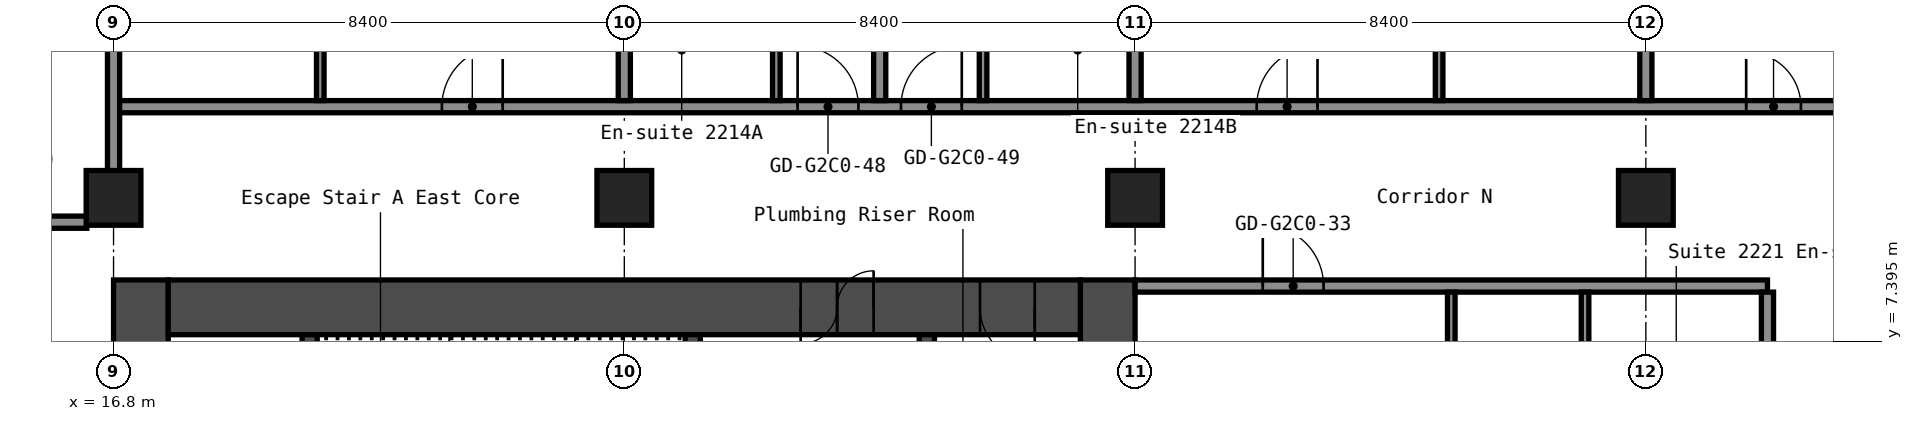
"""IFC4 building model, lengths in metres.
Left out: names, types, materials, properties, quantities, classifications, styles, units other than length and angle.
Written with IfcOpenShell. Run it as: python <this file> out.ifc"""

import sys

from ifc_helpers import new_model, si_unit, direction, frame, frame_2d, origin, origin_2d, place, context, subcontext, project, spatial, rectangle, hollow_rectangle, extrude, element, fill, save


model = new_model("IFC4")
c1 = context("Model", 3, precision=1e-05, world=origin(), true_north=direction((0.0, 1.0)))
c2 = subcontext(c1, "Body", "Model", "MODEL_VIEW")
j1 = project(units=[si_unit("LENGTHUNIT", "METRE"), si_unit("PLANEANGLEUNIT", "RADIAN")], contexts=[c1])
p1 = place(None, origin())
s1 = spatial("IfcSite", under=j1, at=p1, CompositionType="ELEMENT")
p2 = place(p1, origin())
s2 = spatial("IfcBuilding", under=s1, at=p2, CompositionType="ELEMENT")
p3 = place(p2, frame((0.0, 0.0, 81.8)))
s3 = spatial("IfcBuildingStorey", under=s2, at=p3, CompositionType="ELEMENT", Elevation=81.8)
for number, where, z_axis, x_axis in (
    (1, (16.8, 9.75, 0.0), (0.0, 0.0, 1.0), (1.0, 0.0, 0.0)),
    (2, (25.2, 9.75, 0.0), (0.0, 0.0, 1.0), (1.0, 0.0, 0.0)),
    (3, (33.6, 9.75, 0.0), (0.0, 0.0, 1.0), (1.0, 0.0, 0.0)),
    (4, (42.0, 9.75, 0.0), (0.0, 0.0, 1.0), (1.0, 0.0, 0.0)),
):
    element("IfcColumn", number, at=place(p3, frame(where, z_axis=z_axis, x_axis=x_axis)), inside=s3, PredefinedType="COLUMN", context=c2, shape_type="SweptSolid", body=[
        extrude(hollow_rectangle(XDim=0.9, YDim=0.9, WallThickness=0.036, at=origin_2d()), origin(), (0.0, 0.0, 1.0), 2.8),
    ])
p4 = place(p3, frame((17.25, -8.4, 0.0), z_axis=(0.0, 0.0, 1.0), x_axis=(0.0, 1.0, 0.0)))
e5 = element("IfcWall", 5, at=p4, inside=s3, PredefinedType="SHEAR", context=c2, shape_type="SweptSolid", body=[
    extrude(rectangle(XDim=16.8, YDim=0.9, at=frame_2d((8.4, 0.0))), origin(), (0.0, 0.0, 1.0), 2.8),
])
p5 = place(p4, frame((7.6, 0.0, 0.0)))
e6 = element("IfcOpeningElement", 6, at=p5, cuts=e5, PredefinedType="OPENING", context=c2, shape_type="SweptSolid", body=[
    extrude(rectangle(XDim=1.2, YDim=2.1, at=frame_2d((0.6, 1.05))), frame((0.0, 0.46, 0.0), z_axis=(0.0, -1.0, 0.0), x_axis=(1.0, 0.0, 0.0)), (0.0, 0.0, 1.0), 0.92),
])
p6 = place(p3, frame((33.15, -8.4, 0.0), z_axis=(0.0, 0.0, 1.0), x_axis=(0.0, 1.0, 0.0)))
e7 = element("IfcWall", 7, at=p6, inside=s3, PredefinedType="SHEAR", context=c2, shape_type="SweptSolid", body=[
    extrude(rectangle(XDim=16.8, YDim=0.9, at=frame_2d((8.4, 0.0))), origin(), (0.0, 0.0, 1.0), 2.8),
])
p7 = place(p3, frame((17.7, 7.95, 0.0), z_axis=(0.0, 0.0, 1.0), x_axis=(1.0, 0.0, 0.0)))
e8 = element("IfcWall", 8, at=p7, inside=s3, PredefinedType="SHEAR", context=c2, shape_type="SweptSolid", body=[
    extrude(rectangle(XDim=15.0, YDim=0.9, at=frame_2d((7.5, 0.0))), origin(), (0.0, 0.0, 1.0), 2.8),
])
p8 = place(p7, frame((10.4, 0.0, 0.0)))
e9 = element("IfcOpeningElement", 9, at=p8, cuts=e8, PredefinedType="OPENING", context=c2, shape_type="SweptSolid", body=[
    extrude(rectangle(XDim=1.2, YDim=2.1, at=frame_2d((0.6, 1.05))), frame((0.0, 0.46, 0.0), z_axis=(0.0, -1.0, 0.0), x_axis=(1.0, 0.0, 0.0)), (0.0, 0.0, 1.0), 0.92),
])
p9 = place(p7, frame((13.35, 0.0, 0.0)))
e10 = element("IfcOpeningElement", 10, at=p9, cuts=e8, PredefinedType="OPENING", context=c2, shape_type="SweptSolid", body=[
    extrude(rectangle(XDim=0.9, YDim=2.1, at=frame_2d((0.45, 1.05))), frame((0.0, 0.46, 0.0), z_axis=(0.0, -1.0, 0.0), x_axis=(1.0, 0.0, 0.0)), (0.0, 0.0, 1.0), 0.92),
])
p10 = place(p3, frame((20.025, 1.2, 0.0), z_axis=(0.0, 0.0, 1.0), x_axis=(0.0, 1.0, 0.0)))
e11 = element("IfcWall", 11, at=p10, inside=s3, PredefinedType="SHEAR", context=c2, shape_type="SweptSolid", body=[
    extrude(rectangle(XDim=6.3, YDim=0.25, at=frame_2d((3.15, 0.0))), origin(), (0.0, 0.0, 1.0), 2.8),
])
p11 = place(p3, frame((26.325, 3.75, 0.0), z_axis=(0.0, 0.0, 1.0), x_axis=(0.0, 1.0, 0.0)))
e12 = element("IfcWall", 12, at=p11, inside=s3, PredefinedType="SHEAR", context=c2, shape_type="SweptSolid", body=[
    extrude(rectangle(XDim=3.75, YDim=0.25, at=frame_2d((1.875, 0.0))), origin(), (0.0, 0.0, 1.0), 2.8),
])
p12 = place(p11, frame((1.25, 0.0, 0.0)))
e13 = element("IfcOpeningElement", 13, at=p12, cuts=e12, PredefinedType="OPENING", context=c2, shape_type="SweptSolid", body=[
    extrude(rectangle(XDim=1.2, YDim=2.1, at=frame_2d((0.6, 1.05))), frame((0.0, 0.135, 0.0), z_axis=(0.0, -1.0, 0.0), x_axis=(1.0, 0.0, 0.0)), (0.0, 0.0, 1.0), 0.27),
])
p13 = place(p3, frame((30.175, 1.45, 0.0), z_axis=(0.0, 0.0, 1.0), x_axis=(0.0, 1.0, 0.0)))
e14 = element("IfcWall", 14, at=p13, inside=s3, PredefinedType="SHEAR", context=c2, shape_type="SweptSolid", body=[
    extrude(rectangle(XDim=6.05, YDim=0.25, at=frame_2d((3.025, 0.0))), origin(), (0.0, 0.0, 1.0), 2.8),
])
p14 = place(p13, frame((2.625, 0.0, 0.0)))
e15 = element("IfcOpeningElement", 15, at=p14, cuts=e14, PredefinedType="OPENING", context=c2, shape_type="SweptSolid", body=[
    extrude(rectangle(XDim=1.1, YDim=2.1, at=frame_2d((0.55, 1.05))), frame((0.0, 0.135, 0.0), z_axis=(0.0, -1.0, 0.0), x_axis=(1.0, 0.0, 0.0)), (0.0, 0.0, 1.0), 0.27),
])
p15 = place(p3, frame((33.6, 8.3, 0.0), z_axis=(0.0, 0.0, 1.0), x_axis=(1.0, 0.0, 0.0)))
e16 = element("IfcWall", 16, at=p15, inside=s3, PredefinedType="PARTITIONING", context=c2, shape_type="SweptSolid", body=[
    extrude(rectangle(XDim=10.4, YDim=0.2, at=frame_2d((5.2, 0.0))), origin(), (0.0, 0.0, 1.0), 2.8),
])
p16 = place(p15, frame((2.1, 0.0, 0.0)))
e17 = element("IfcOpeningElement", 17, at=p16, cuts=e16, PredefinedType="OPENING", context=c2, shape_type="SweptSolid", body=[
    extrude(rectangle(XDim=1.0, YDim=2.1, at=frame_2d((0.5, 1.05))), frame((0.0, 0.11, 0.0), z_axis=(0.0, -1.0, 0.0), x_axis=(1.0, 0.0, 0.0)), (0.0, 0.0, 1.0), 0.22),
])
p17 = place(p3, frame((-16.36, 9.35, 0.0), z_axis=(0.0, 0.0, 1.0), x_axis=(1.0, 0.0, 0.0)))
e18 = element("IfcWall", 18, at=p17, inside=s3, PredefinedType="PARTITIONING", context=c2, shape_type="SweptSolid", body=[
    extrude(rectangle(XDim=32.72, YDim=0.2, at=frame_2d((16.36, 0.0))), origin(), (0.0, 0.0, 1.0), 2.8),
])
p18 = place(p17, frame((1.56, 0.0, 0.0)))
e19 = element("IfcOpeningElement", 19, at=p18, cuts=e18, PredefinedType="OPENING", context=c2, shape_type="SweptSolid", body=[
    extrude(rectangle(XDim=1.0, YDim=2.1, at=frame_2d((0.5, 1.05))), frame((0.0, 0.11, 0.0), z_axis=(0.0, -1.0, 0.0), x_axis=(1.0, 0.0, 0.0)), (0.0, 0.0, 1.0), 0.22),
])
p19 = place(p17, frame((10.81, 0.0, 0.0)))
e20 = element("IfcOpeningElement", 20, at=p19, cuts=e18, PredefinedType="OPENING", context=c2, shape_type="SweptSolid", body=[
    extrude(rectangle(XDim=1.0, YDim=2.1, at=frame_2d((0.5, 1.05))), frame((0.0, 0.11, 0.0), z_axis=(0.0, -1.0, 0.0), x_axis=(1.0, 0.0, 0.0)), (0.0, 0.0, 1.0), 0.22),
])
p20 = place(p17, frame((12.51, 0.0, 0.0)))
e21 = element("IfcOpeningElement", 21, at=p20, cuts=e18, PredefinedType="OPENING", context=c2, shape_type="SweptSolid", body=[
    extrude(rectangle(XDim=1.0, YDim=2.1, at=frame_2d((0.5, 1.05))), frame((0.0, 0.11, 0.0), z_axis=(0.0, -1.0, 0.0), x_axis=(1.0, 0.0, 0.0)), (0.0, 0.0, 1.0), 0.22),
])
p21 = place(p17, frame((18.26, 0.0, 0.0)))
e22 = element("IfcOpeningElement", 22, at=p21, cuts=e18, PredefinedType="OPENING", context=c2, shape_type="SweptSolid", body=[
    extrude(rectangle(XDim=0.9, YDim=2.1, at=frame_2d((0.45, 1.05))), frame((0.0, 0.11, 0.0), z_axis=(0.0, -1.0, 0.0), x_axis=(1.0, 0.0, 0.0)), (0.0, 0.0, 1.0), 0.22),
])
p22 = place(p17, frame((22.46, 0.0, 0.0)))
e23 = element("IfcOpeningElement", 23, at=p22, cuts=e18, PredefinedType="OPENING", context=c2, shape_type="SweptSolid", body=[
    extrude(rectangle(XDim=0.9, YDim=2.1, at=frame_2d((0.45, 1.05))), frame((0.0, 0.11, 0.0), z_axis=(0.0, -1.0, 0.0), x_axis=(1.0, 0.0, 0.0)), (0.0, 0.0, 1.0), 0.22),
])
p23 = place(p17, frame((26.58, 0.0, 0.0)))
e24 = element("IfcOpeningElement", 24, at=p23, cuts=e18, PredefinedType="OPENING", context=c2, shape_type="SweptSolid", body=[
    extrude(rectangle(XDim=0.9, YDim=2.1, at=frame_2d((0.45, 1.05))), frame((0.0, 0.11, 0.0), z_axis=(0.0, -1.0, 0.0), x_axis=(1.0, 0.0, 0.0)), (0.0, 0.0, 1.0), 0.22),
])
p24 = place(p17, frame((30.78, 0.0, 0.0)))
e25 = element("IfcOpeningElement", 25, at=p24, cuts=e18, PredefinedType="OPENING", context=c2, shape_type="SweptSolid", body=[
    extrude(rectangle(XDim=0.9, YDim=2.1, at=frame_2d((0.45, 1.05))), frame((0.0, 0.11, 0.0), z_axis=(0.0, -1.0, 0.0), x_axis=(1.0, 0.0, 0.0)), (0.0, 0.0, 1.0), 0.22),
])
p25 = place(p3, frame((16.8, 11.25, 0.0), z_axis=(0.0, 0.0, 1.0), x_axis=(1.0, 0.0, 0.0)))
e26 = element("IfcWall", 26, at=p25, inside=s3, PredefinedType="PARTITIONING", context=c2, shape_type="SweptSolid", body=[
    extrude(rectangle(XDim=29.7, YDim=0.2, at=frame_2d((14.85, 0.0))), origin(), (0.0, 0.0, 1.0), 2.8),
])
p26 = place(p25, frame((5.4, 0.0, 0.0)))
e27 = element("IfcOpeningElement", 27, at=p26, cuts=e26, PredefinedType="OPENING", context=c2, shape_type="SweptSolid", body=[
    extrude(rectangle(XDim=1.0, YDim=2.1, at=frame_2d((0.5, 1.05))), frame((0.0, 0.11, 0.0), z_axis=(0.0, -1.0, 0.0), x_axis=(1.0, 0.0, 0.0)), (0.0, 0.0, 1.0), 0.22),
])
p27 = place(p25, frame((11.25, 0.0, 0.0)))
e28 = element("IfcOpeningElement", 28, at=p27, cuts=e26, PredefinedType="OPENING", context=c2, shape_type="SweptSolid", body=[
    extrude(rectangle(XDim=1.0, YDim=2.1, at=frame_2d((0.5, 1.05))), frame((0.0, 0.11, 0.0), z_axis=(0.0, -1.0, 0.0), x_axis=(1.0, 0.0, 0.0)), (0.0, 0.0, 1.0), 0.22),
])
p28 = place(p25, frame((12.95, 0.0, 0.0)))
e29 = element("IfcOpeningElement", 29, at=p28, cuts=e26, PredefinedType="OPENING", context=c2, shape_type="SweptSolid", body=[
    extrude(rectangle(XDim=1.0, YDim=2.1, at=frame_2d((0.5, 1.05))), frame((0.0, 0.11, 0.0), z_axis=(0.0, -1.0, 0.0), x_axis=(1.0, 0.0, 0.0)), (0.0, 0.0, 1.0), 0.22),
])
p29 = place(p25, frame((18.8, 0.0, 0.0)))
e30 = element("IfcOpeningElement", 30, at=p29, cuts=e26, PredefinedType="OPENING", context=c2, shape_type="SweptSolid", body=[
    extrude(rectangle(XDim=1.0, YDim=2.1, at=frame_2d((0.5, 1.05))), frame((0.0, 0.11, 0.0), z_axis=(0.0, -1.0, 0.0), x_axis=(1.0, 0.0, 0.0)), (0.0, 0.0, 1.0), 0.22),
])
p30 = place(p25, frame((26.85, 0.0, 0.0)))
e31 = element("IfcOpeningElement", 31, at=p30, cuts=e26, PredefinedType="OPENING", context=c2, shape_type="SweptSolid", body=[
    extrude(rectangle(XDim=0.9, YDim=2.1, at=frame_2d((0.45, 1.05))), frame((0.0, 0.11, 0.0), z_axis=(0.0, -1.0, 0.0), x_axis=(1.0, 0.0, 0.0)), (0.0, 0.0, 1.0), 0.22),
])
p31 = place(p3, frame((16.8, 10.19, 0.0), z_axis=(0.0, 0.0, 1.0), x_axis=(0.0, 1.0, 0.0)))
e32 = element("IfcWall", 32, at=p31, inside=s3, PredefinedType="PARTITIONING", context=c2, shape_type="SweptSolid", body=[
    extrude(rectangle(XDim=13.36, YDim=0.2, at=frame_2d((6.68, 0.0))), origin(), (0.0, 0.0, 1.0), 2.8),
])
p32 = place(p3, frame((20.2, 11.35, 0.0), z_axis=(0.0, 0.0, 1.0), x_axis=(0.0, 1.0, 0.0)))
e33 = element("IfcWall", 33, at=p32, inside=s3, PredefinedType="PARTITIONING", context=c2, shape_type="SweptSolid", body=[
    extrude(rectangle(XDim=3.3, YDim=0.125, at=frame_2d((1.65, 0.0))), origin(), (0.0, 0.0, 1.0), 2.8),
])
p33 = place(p3, frame((25.2, 11.35, 0.0), z_axis=(0.0, 0.0, 1.0), x_axis=(0.0, 1.0, 0.0)))
e34 = element("IfcWall", 34, at=p33, inside=s3, PredefinedType="PARTITIONING", context=c2, shape_type="SweptSolid", body=[
    extrude(rectangle(XDim=12.2, YDim=0.2, at=frame_2d((6.1, 0.0))), origin(), (0.0, 0.0, 1.0), 2.8),
])
p34 = place(p3, frame((27.7, 11.35, 0.0), z_axis=(0.0, 0.0, 1.0), x_axis=(0.0, 1.0, 0.0)))
e35 = element("IfcWall", 35, at=p34, inside=s3, PredefinedType="PARTITIONING", context=c2, shape_type="SweptSolid", body=[
    extrude(rectangle(XDim=2.9, YDim=0.125, at=frame_2d((1.45, 0.0))), origin(), (0.0, 0.0, 1.0), 2.8),
])
p35 = place(p34, frame((1.5, 0.0, 0.0)))
e36 = element("IfcOpeningElement", 36, at=p35, cuts=e35, PredefinedType="OPENING", context=c2, shape_type="SweptSolid", body=[
    extrude(rectangle(XDim=0.8, YDim=2.1, at=frame_2d((0.4, 1.05))), frame((0.0, 0.073, 0.0), z_axis=(0.0, -1.0, 0.0), x_axis=(1.0, 0.0, 0.0)), (0.0, 0.0, 1.0), 0.145),
])
p36 = place(p3, frame((29.4, 11.35, 0.0), z_axis=(0.0, 0.0, 1.0), x_axis=(0.0, 1.0, 0.0)))
e37 = element("IfcWall", 37, at=p36, inside=s3, PredefinedType="PARTITIONING", context=c2, shape_type="SweptSolid", body=[
    extrude(rectangle(XDim=12.2, YDim=0.2, at=frame_2d((6.1, 0.0))), origin(), (0.0, 0.0, 1.0), 2.8),
])
p37 = place(p3, frame((31.1, 11.35, 0.0), z_axis=(0.0, 0.0, 1.0), x_axis=(0.0, 1.0, 0.0)))
e38 = element("IfcWall", 38, at=p37, inside=s3, PredefinedType="PARTITIONING", context=c2, shape_type="SweptSolid", body=[
    extrude(rectangle(XDim=2.9, YDim=0.125, at=frame_2d((1.45, 0.0))), origin(), (0.0, 0.0, 1.0), 2.8),
])
p38 = place(p37, frame((1.5, 0.0, 0.0)))
e39 = element("IfcOpeningElement", 39, at=p38, cuts=e38, PredefinedType="OPENING", context=c2, shape_type="SweptSolid", body=[
    extrude(rectangle(XDim=0.8, YDim=2.1, at=frame_2d((0.4, 1.05))), frame((0.0, 0.073, 0.0), z_axis=(0.0, -1.0, 0.0), x_axis=(1.0, 0.0, 0.0)), (0.0, 0.0, 1.0), 0.145),
])
p39 = place(p3, frame((33.6, 11.35, 0.0), z_axis=(0.0, 0.0, 1.0), x_axis=(0.0, 1.0, 0.0)))
e40 = element("IfcWall", 40, at=p39, inside=s3, PredefinedType="PARTITIONING", context=c2, shape_type="SweptSolid", body=[
    extrude(rectangle(XDim=12.2, YDim=0.2, at=frame_2d((6.1, 0.0))), origin(), (0.0, 0.0, 1.0), 2.8),
])
p40 = place(p3, frame((38.6, 11.35, 0.0), z_axis=(0.0, 0.0, 1.0), x_axis=(0.0, 1.0, 0.0)))
e41 = element("IfcWall", 41, at=p40, inside=s3, PredefinedType="PARTITIONING", context=c2, shape_type="SweptSolid", body=[
    extrude(rectangle(XDim=3.3, YDim=0.125, at=frame_2d((1.65, 0.0))), origin(), (0.0, 0.0, 1.0), 2.8),
])
p41 = place(p3, frame((38.8, 0.1, 0.0), z_axis=(0.0, 0.0, 1.0), x_axis=(0.0, 1.0, 0.0)))
e42 = element("IfcWall", 42, at=p41, inside=s3, PredefinedType="PARTITIONING", context=c2, shape_type="SweptSolid", body=[
    extrude(rectangle(XDim=8.1, YDim=0.125, at=frame_2d((4.05, 0.0))), origin(), (0.0, 0.0, 1.0), 2.8),
])
p42 = place(p41, frame((3.15, 0.0, 0.0)))
e43 = element("IfcOpeningElement", 43, at=p42, cuts=e42, PredefinedType="OPENING", context=c2, shape_type="SweptSolid", body=[
    extrude(rectangle(XDim=0.9, YDim=2.1, at=frame_2d((0.45, 1.05))), frame((0.0, 0.073, 0.0), z_axis=(0.0, -1.0, 0.0), x_axis=(1.0, 0.0, 0.0)), (0.0, 0.0, 1.0), 0.145),
])
p43 = place(p3, frame((41.0, 5.1, 0.0), z_axis=(0.0, 0.0, 1.0), x_axis=(0.0, 1.0, 0.0)))
e44 = element("IfcWall", 44, at=p43, inside=s3, PredefinedType="PARTITIONING", context=c2, shape_type="SweptSolid", body=[
    extrude(rectangle(XDim=3.1, YDim=0.125, at=frame_2d((1.55, 0.0))), origin(), (0.0, 0.0, 1.0), 2.8),
])
p44 = place(p3, frame((42.0, 11.35, 0.0), z_axis=(0.0, 0.0, 1.0), x_axis=(0.0, 1.0, 0.0)))
e45 = element("IfcWall", 45, at=p44, inside=s3, PredefinedType="PARTITIONING", context=c2, shape_type="SweptSolid", body=[
    extrude(rectangle(XDim=12.2, YDim=0.2, at=frame_2d((6.1, 0.0))), origin(), (0.0, 0.0, 1.0), 2.8),
])
p45 = place(p3, frame((44.0, -8.2, 0.0), z_axis=(0.0, 0.0, 1.0), x_axis=(0.0, 1.0, 0.0)))
e46 = element("IfcWall", 46, at=p45, inside=s3, PredefinedType="PARTITIONING", context=c2, shape_type="SweptSolid", body=[
    extrude(rectangle(XDim=16.4, YDim=0.2, at=frame_2d((8.2, 0.0))), origin(), (0.0, 0.0, 1.0), 2.8),
])
p46 = place(p8, origin())
e47 = element("IfcDoor", 47, at=p46, inside=s3, OperationType="DOUBLE_DOOR_SINGLE_SWING", PredefinedType="DOOR", context=c2, shape_type="SweptSolid", body=[
    extrude(rectangle(XDim=1.2, YDim=2.1, at=frame_2d((0.6, 1.05))), frame((0.0, 0.025, 0.0), z_axis=(0.0, -1.0, 0.0), x_axis=(1.0, 0.0, 0.0)), (0.0, 0.0, 1.0), 0.05),
])
fill(e9, e47)
p47 = place(p9, origin())
e48 = element("IfcDoor", 48, at=p47, inside=s3, OperationType="SINGLE_SWING_RIGHT", PredefinedType="DOOR", context=c2, shape_type="SweptSolid", body=[
    extrude(rectangle(XDim=0.9, YDim=2.1, at=frame_2d((0.45, 1.05))), frame((0.0, 0.025, 0.0), z_axis=(0.0, -1.0, 0.0), x_axis=(1.0, 0.0, 0.0)), (0.0, 0.0, 1.0), 0.05),
])
fill(e10, e48)
p48 = place(p16, origin())
e49 = element("IfcDoor", 49, at=p48, inside=s3, OperationType="SINGLE_SWING_RIGHT", PredefinedType="DOOR", context=c2, shape_type="SweptSolid", body=[
    extrude(rectangle(XDim=1.0, YDim=2.1, at=frame_2d((0.5, 1.05))), frame((0.0, 0.025, 0.0), z_axis=(0.0, -1.0, 0.0), x_axis=(1.0, 0.0, 0.0)), (0.0, 0.0, 1.0), 0.05),
])
fill(e17, e49)
p49 = place(p26, origin())
e50 = element("IfcDoor", 50, at=p49, inside=s3, OperationType="SINGLE_SWING_LEFT", PredefinedType="DOOR", context=c2, shape_type="SweptSolid", body=[
    extrude(rectangle(XDim=1.0, YDim=2.1, at=frame_2d((0.5, 1.05))), frame((0.0, 0.025, 0.0), z_axis=(0.0, -1.0, 0.0), x_axis=(1.0, 0.0, 0.0)), (0.0, 0.0, 1.0), 0.05),
])
fill(e27, e50)
p50 = place(p27, origin())
e51 = element("IfcDoor", 51, at=p50, inside=s3, OperationType="SINGLE_SWING_RIGHT", PredefinedType="DOOR", context=c2, shape_type="SweptSolid", body=[
    extrude(rectangle(XDim=1.0, YDim=2.1, at=frame_2d((0.5, 1.05))), frame((0.0, 0.025, 0.0), z_axis=(0.0, -1.0, 0.0), x_axis=(1.0, 0.0, 0.0)), (0.0, 0.0, 1.0), 0.05),
])
fill(e28, e51)
p51 = place(p28, origin())
e52 = element("IfcDoor", 52, at=p51, inside=s3, OperationType="SINGLE_SWING_LEFT", PredefinedType="DOOR", context=c2, shape_type="SweptSolid", body=[
    extrude(rectangle(XDim=1.0, YDim=2.1, at=frame_2d((0.5, 1.05))), frame((0.0, 0.025, 0.0), z_axis=(0.0, -1.0, 0.0), x_axis=(1.0, 0.0, 0.0)), (0.0, 0.0, 1.0), 0.05),
])
fill(e29, e52)
p52 = place(p29, origin())
e53 = element("IfcDoor", 53, at=p52, inside=s3, OperationType="SINGLE_SWING_LEFT", PredefinedType="DOOR", context=c2, shape_type="SweptSolid", body=[
    extrude(rectangle(XDim=1.0, YDim=2.1, at=frame_2d((0.5, 1.05))), frame((0.0, 0.025, 0.0), z_axis=(0.0, -1.0, 0.0), x_axis=(1.0, 0.0, 0.0)), (0.0, 0.0, 1.0), 0.05),
])
fill(e30, e53)
p53 = place(p30, origin())
e54 = element("IfcDoor", 54, at=p53, inside=s3, OperationType="SINGLE_SWING_RIGHT", PredefinedType="DOOR", context=c2, shape_type="SweptSolid", body=[
    extrude(rectangle(XDim=0.9, YDim=2.1, at=frame_2d((0.45, 1.05))), frame((0.0, 0.025, 0.0), z_axis=(0.0, -1.0, 0.0), x_axis=(1.0, 0.0, 0.0)), (0.0, 0.0, 1.0), 0.05),
])
fill(e31, e54)
save(model, sys.argv[1])
